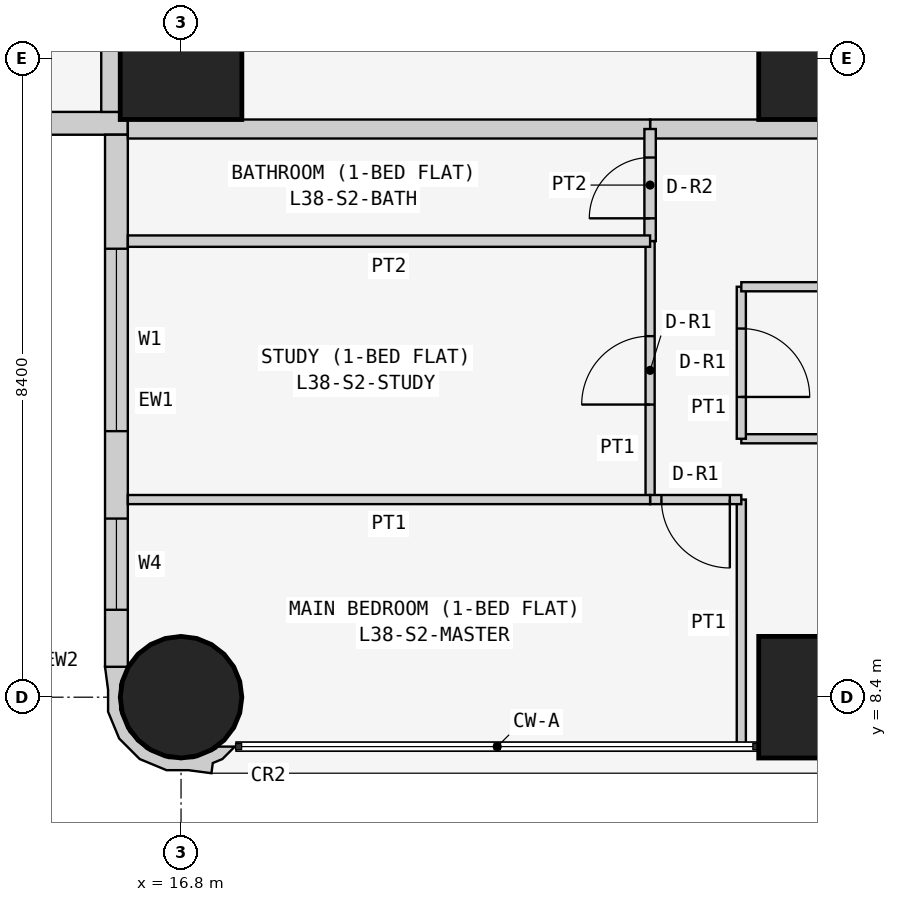
"""IFC4 building model, lengths in metres.
Left out: names, types, materials, properties, quantities, classifications, styles, units other than length and angle.
Written with IfcOpenShell. Run it as: python <this file> out.ifc"""

import sys

from ifc_helpers import new_model, si_unit, direction, frame, frame_2d, origin, origin_2d, place, context, subcontext, project, spatial, polyline, rectangle, circle, outline, extrude, element, fill, save


model = new_model("IFC4")
c1 = context("Model", 3, precision=1e-05, world=origin(), true_north=direction((0.0, 1.0)))
c2 = subcontext(c1, "Body", "Model", "MODEL_VIEW")
j1 = project(units=[si_unit("LENGTHUNIT", "METRE"), si_unit("PLANEANGLEUNIT", "RADIAN")], contexts=[c1])
p1 = place(None, origin())
s1 = spatial("IfcSite", under=j1, at=p1, CompositionType="ELEMENT")
p2 = place(p1, origin())
s2 = spatial("IfcBuilding", under=s1, at=p2, CompositionType="ELEMENT")
p3 = place(p2, frame((0.0, 0.0, 148.5)))
s3 = spatial("IfcBuildingStorey", under=s2, at=p3, CompositionType="ELEMENT", Elevation=148.5)
p4 = place(p3, frame((16.8, 8.4, 0.0), z_axis=(0.0, 0.0, 1.0), x_axis=(1.0, 0.0, 0.0)))
e1 = element("IfcColumn", 1, at=p4, inside=s3, PredefinedType="COLUMN", context=c2, shape_type="SweptSolid", body=[
    extrude(circle(Radius=0.8, at=origin_2d()), origin(), (0.0, 0.0, 1.0), 3.6),
])
for number, where, z_axis, x_axis in (
    (2, (16.8, 16.8, 0.0), (0.0, 0.0, 1.0), (1.0, 0.0, 0.0)),
    (3, (25.2, 8.4, 0.0), (0.0, 0.0, 1.0), (1.0, 0.0, 0.0)),
    (4, (25.2, 16.8, 0.0), (0.0, 0.0, 1.0), (1.0, 0.0, 0.0)),
):
    element("IfcColumn", number, at=place(p3, frame(where, z_axis=z_axis, x_axis=x_axis)), inside=s3, PredefinedType="COLUMN", context=c2, shape_type="SweptSolid", body=[
        extrude(rectangle(XDim=1.6, YDim=1.6, at=origin_2d()), origin(), (0.0, 0.0, 1.0), 3.6),
    ])
p5 = place(p3, frame((0.4, 15.95, 0.0), z_axis=(0.0, 0.0, 1.0), x_axis=(1.0, 0.0, 0.0)))
e5 = element("IfcWall", 5, at=p5, inside=s3, PredefinedType="SOLIDWALL", context=c2, shape_type="SweptSolid", body=[
    extrude(rectangle(XDim=15.7, YDim=0.3, at=frame_2d((7.85, 0.0))), origin(), (0.0, 0.0, 1.0), 3.45),
])
p6 = place(p5, frame((12.4, 0.0, 0.9)))
e6 = element("IfcOpeningElement", 6, at=p6, cuts=e5, PredefinedType="OPENING", context=c2, shape_type="SweptSolid", body=[
    extrude(rectangle(XDim=1.8, YDim=1.5, at=frame_2d((0.9, 0.75))), frame((0.0, 0.16, 0.0), z_axis=(0.0, -1.0, 0.0), x_axis=(1.0, 0.0, 0.0)), (0.0, 0.0, 1.0), 0.32),
])
p7 = place(p5, frame((9.55, 0.0, 1.5)))
e7 = element("IfcOpeningElement", 7, at=p7, cuts=e5, PredefinedType="OPENING", context=c2, shape_type="SweptSolid", body=[
    extrude(rectangle(XDim=0.9, YDim=0.7, at=frame_2d((0.45, 0.35))), frame((0.0, 0.16, 0.0), z_axis=(0.0, -1.0, 0.0), x_axis=(1.0, 0.0, 0.0)), (0.0, 0.0, 1.0), 0.32),
])
p8 = place(p5, frame((5.1, 0.0, 0.9)))
e8 = element("IfcOpeningElement", 8, at=p8, cuts=e5, PredefinedType="OPENING", context=c2, shape_type="SweptSolid", body=[
    extrude(rectangle(XDim=1.8, YDim=1.5, at=frame_2d((0.9, 0.75))), frame((0.0, 0.16, 0.0), z_axis=(0.0, -1.0, 0.0), x_axis=(1.0, 0.0, 0.0)), (0.0, 0.0, 1.0), 0.32),
])
p9 = place(p5, frame((2.0, 0.0, 0.0)))
e9 = element("IfcOpeningElement", 9, at=p9, cuts=e5, PredefinedType="OPENING", context=c2, shape_type="SweptSolid", body=[
    extrude(rectangle(XDim=0.9, YDim=2.4, at=frame_2d((0.45, 1.2))), frame((0.0, 0.16, 0.0), z_axis=(0.0, -1.0, 0.0), x_axis=(1.0, 0.0, 0.0)), (0.0, 0.0, 1.0), 0.32),
])
p10 = place(p5, frame((0.7, 0.0, 0.9)))
e10 = element("IfcOpeningElement", 10, at=p10, cuts=e5, PredefinedType="OPENING", context=c2, shape_type="SweptSolid", body=[
    extrude(rectangle(XDim=1.2, YDim=1.5, at=frame_2d((0.6, 0.75))), frame((0.0, 0.16, 0.0), z_axis=(0.0, -1.0, 0.0), x_axis=(1.0, 0.0, 0.0)), (0.0, 0.0, 1.0), 0.32),
])
p11 = place(p3, frame((15.95, 15.8, 0.0), z_axis=(0.0, 0.0, 1.0), x_axis=(0.0, -1.0, 0.0)))
e11 = element("IfcWall", 11, at=p11, inside=s3, PredefinedType="SOLIDWALL", context=c2, shape_type="SweptSolid", body=[
    extrude(rectangle(XDim=7.0, YDim=0.3, at=frame_2d((3.5, 0.0))), origin(), (0.0, 0.0, 1.0), 3.45),
])
p12 = place(p11, frame((1.5, 0.0, 0.9)))
e12 = element("IfcOpeningElement", 12, at=p12, cuts=e11, PredefinedType="OPENING", context=c2, shape_type="SweptSolid", body=[
    extrude(rectangle(XDim=2.4, YDim=1.5, at=frame_2d((1.2, 0.75))), frame((0.0, 0.16, 0.0), z_axis=(0.0, -1.0, 0.0), x_axis=(1.0, 0.0, 0.0)), (0.0, 0.0, 1.0), 0.32),
])
p13 = place(p11, frame((5.05, 0.0, 0.9)))
e13 = element("IfcOpeningElement", 13, at=p13, cuts=e11, PredefinedType="OPENING", context=c2, shape_type="SweptSolid", body=[
    extrude(rectangle(XDim=1.2, YDim=1.5, at=frame_2d((0.6, 0.75))), frame((0.0, 0.16, 0.0), z_axis=(0.0, -1.0, 0.0), x_axis=(1.0, 0.0, 0.0)), (0.0, 0.0, 1.0), 0.32),
])
p14 = place(p3, frame((15.983, 8.727, 0.0), z_axis=(0.0, 0.0, 1.0), x_axis=(-0.343276641956, -0.93923434088, 0.0)))
e14 = element("IfcWall", 14, at=p14, inside=s3, PredefinedType="SOLIDWALL", context=c2, shape_type="SweptSolid", body=[
    extrude(outline(polyline([(0.829, 1.599), (0.697, 1.569), (0.604, 1.67), (0.394, 1.767), (0.471, 1.556), (0.509, 1.539), (0.724, 1.304), (0.833, 1.005), (0.82, 0.686), (0.686, 0.397), (0.451, 0.182), (0.152, 0.073), (-0.116, 0.084), (-0.127, 0.078), (-0.146, 0.071), (-0.006, -0.197), (0.266, -0.055), (0.535, 0.044), (0.817, 0.302), (0.978, 0.648), (0.994, 1.03), (0.895, 1.3), (0.829, 1.599)])), origin(), (0.0, 0.0, 1.0), 3.45),
])
p15 = place(p3, frame((29.4, 15.875, 0.0), z_axis=(0.0, 0.0, 1.0), x_axis=(-1.0, 0.0, 0.0)))
e15 = element("IfcWall", 15, at=p15, inside=s3, PredefinedType="PARTITIONING", context=c2, shape_type="SweptSolid", body=[
    extrude(rectangle(XDim=6.429, YDim=0.25, at=frame_2d((3.214, 0.0))), origin(), (0.0, 0.0, 1.0), 3.45),
])
p16 = place(p15, frame((0.5, 0.0, 0.0)))
e16 = element("IfcOpeningElement", 16, at=p16, cuts=e15, PredefinedType="OPENING", context=c2, shape_type="SweptSolid", body=[
    extrude(rectangle(XDim=1.0, YDim=2.1, at=frame_2d((0.5, 1.05))), frame((0.0, 0.135, 0.0), z_axis=(0.0, -1.0, 0.0), x_axis=(1.0, 0.0, 0.0)), (0.0, 0.0, 1.0), 0.27),
])
for number, where, z_axis, x_axis in (
    (17, (22.971, 15.875, 0.0), (0.0, 0.0, 1.0), (-1.0, 0.0, 0.0)),
    (18, (15.875, 16.1, 0.0), (0.0, 0.0, 1.0), (0.0, 1.0, 0.0)),
):
    element("IfcWall", number, at=place(p3, frame(where, z_axis=z_axis, x_axis=x_axis)), inside=s3, PredefinedType="PARTITIONING", context=c2, shape_type="SweptSolid", body=[
        extrude(rectangle(XDim=6.871, YDim=0.25, at=frame_2d((3.436, 0.0))), origin(), (0.0, 0.0, 1.0), 3.45),
    ])
p17 = place(p3, frame((29.4, 11.8, 0.0), z_axis=(0.0, 0.0, 1.0), x_axis=(-1.0, 0.0, 0.0)))
e19 = element("IfcWall", 19, at=p17, inside=s3, PredefinedType="PARTITIONING", context=c2, shape_type="SweptSolid", body=[
    extrude(rectangle(XDim=5.229, YDim=0.12, at=frame_2d((2.615, 0.0))), origin(), (0.0, 0.0, 1.0), 3.45),
])
p18 = place(p3, frame((24.171, 11.8, 0.0), z_axis=(0.0, 0.0, 1.0), x_axis=(0.0, 1.0, 0.0)))
e20 = element("IfcWall", 20, at=p18, inside=s3, PredefinedType="PARTITIONING", context=c2, shape_type="SweptSolid", body=[
    extrude(rectangle(XDim=2.0, YDim=0.12, at=frame_2d((1.0, 0.0))), origin(), (0.0, 0.0, 1.0), 3.45),
])
p19 = place(p18, frame((0.55, 0.0, 0.0)))
e21 = element("IfcOpeningElement", 21, at=p19, cuts=e20, PredefinedType="OPENING", context=c2, shape_type="SweptSolid", body=[
    extrude(rectangle(XDim=0.9, YDim=2.1, at=frame_2d((0.45, 1.05))), frame((0.0, 0.07, 0.0), z_axis=(0.0, -1.0, 0.0), x_axis=(1.0, 0.0, 0.0)), (0.0, 0.0, 1.0), 0.14),
])
p20 = place(p3, frame((24.171, 13.8, 0.0), z_axis=(0.0, 0.0, 1.0), x_axis=(1.0, 0.0, 0.0)))
e22 = element("IfcWall", 22, at=p20, inside=s3, PredefinedType="PARTITIONING", context=c2, shape_type="SweptSolid", body=[
    extrude(rectangle(XDim=5.229, YDim=0.12, at=frame_2d((2.615, 0.0))), origin(), (0.0, 0.0, 1.0), 3.45),
])
p21 = place(p3, frame((22.971, 14.4, 0.0), z_axis=(0.0, 0.0, 1.0), x_axis=(0.0, 1.0, 0.0)))
e23 = element("IfcWall", 23, at=p21, inside=s3, PredefinedType="PARTITIONING", context=c2, shape_type="SweptSolid", body=[
    extrude(rectangle(XDim=1.475, YDim=0.15, at=frame_2d((0.738, 0.0))), origin(), (0.0, 0.0, 1.0), 3.45),
])
p22 = place(p21, frame((0.3, 0.0, 0.0)))
e24 = element("IfcOpeningElement", 24, at=p22, cuts=e23, PredefinedType="OPENING", context=c2, shape_type="SweptSolid", body=[
    extrude(rectangle(XDim=0.8, YDim=2.1, at=frame_2d((0.4, 1.05))), frame((0.0, 0.085, 0.0), z_axis=(0.0, -1.0, 0.0), x_axis=(1.0, 0.0, 0.0)), (0.0, 0.0, 1.0), 0.17),
])
p23 = place(p3, frame((22.971, 11.0, 0.0), z_axis=(0.0, 0.0, 1.0), x_axis=(0.0, 1.0, 0.0)))
e25 = element("IfcWall", 25, at=p23, inside=s3, PredefinedType="PARTITIONING", context=c2, shape_type="SweptSolid", body=[
    extrude(rectangle(XDim=3.4, YDim=0.12, at=frame_2d((1.7, 0.0))), origin(), (0.0, 0.0, 1.0), 3.45),
])
p24 = place(p23, frame((1.25, 0.0, 0.0)))
e26 = element("IfcOpeningElement", 26, at=p24, cuts=e25, PredefinedType="OPENING", context=c2, shape_type="SweptSolid", body=[
    extrude(rectangle(XDim=0.9, YDim=2.1, at=frame_2d((0.45, 1.05))), frame((0.0, 0.07, 0.0), z_axis=(0.0, -1.0, 0.0), x_axis=(1.0, 0.0, 0.0)), (0.0, 0.0, 1.0), 0.14),
])
p25 = place(p3, frame((24.171, 7.75, 0.0), z_axis=(0.0, 0.0, 1.0), x_axis=(0.0, 1.0, 0.0)))
e27 = element("IfcWall", 27, at=p25, inside=s3, PredefinedType="PARTITIONING", context=c2, shape_type="SweptSolid", body=[
    extrude(rectangle(XDim=3.25, YDim=0.12, at=frame_2d((1.625, 0.0))), origin(), (0.0, 0.0, 1.0), 3.45),
])
p26 = place(p3, frame((24.171, 11.0, 0.0), z_axis=(0.0, 0.0, 1.0), x_axis=(-1.0, 0.0, 0.0)))
e28 = element("IfcWall", 28, at=p26, inside=s3, PredefinedType="PARTITIONING", context=c2, shape_type="SweptSolid", body=[
    extrude(rectangle(XDim=1.2, YDim=0.12, at=frame_2d((0.6, 0.0))), origin(), (0.0, 0.0, 1.0), 3.45),
])
p27 = place(p26, frame((0.151, 0.0, 0.0)))
e29 = element("IfcOpeningElement", 29, at=p27, cuts=e28, PredefinedType="OPENING", context=c2, shape_type="SweptSolid", body=[
    extrude(rectangle(XDim=0.9, YDim=2.1, at=frame_2d((0.45, 1.05))), frame((0.0, 0.07, 0.0), z_axis=(0.0, -1.0, 0.0), x_axis=(1.0, 0.0, 0.0)), (0.0, 0.0, 1.0), 0.14),
])
p28 = place(p3, frame((22.971, 14.4, 0.0), z_axis=(0.0, 0.0, 1.0), x_axis=(-1.0, 0.0, 0.0)))
e30 = element("IfcWall", 30, at=p28, inside=s3, PredefinedType="PARTITIONING", context=c2, shape_type="SweptSolid", body=[
    extrude(rectangle(XDim=6.871, YDim=0.15, at=frame_2d((3.436, 0.0))), origin(), (0.0, 0.0, 1.0), 3.45),
])
p29 = place(p3, frame((22.971, 11.0, 0.0), z_axis=(0.0, 0.0, 1.0), x_axis=(-1.0, 0.0, 0.0)))
e31 = element("IfcWall", 31, at=p29, inside=s3, PredefinedType="PARTITIONING", context=c2, shape_type="SweptSolid", body=[
    extrude(rectangle(XDim=6.871, YDim=0.12, at=frame_2d((3.436, 0.0))), origin(), (0.0, 0.0, 1.0), 3.45),
])
p30 = place(p12, origin())
e32 = element("IfcWindow", 32, at=p30, inside=s3, PartitioningType="SINGLE_PANEL", PredefinedType="WINDOW", context=c2, shape_type="SweptSolid", body=[
    extrude(rectangle(XDim=2.4, YDim=1.5, at=frame_2d((1.2, 0.75))), frame((0.0, 0.03, 0.0), z_axis=(0.0, -1.0, 0.0), x_axis=(1.0, 0.0, 0.0)), (0.0, 0.0, 1.0), 0.06),
])
fill(e12, e32)
p31 = place(p13, origin())
e33 = element("IfcWindow", 33, at=p31, inside=s3, PartitioningType="SINGLE_PANEL", PredefinedType="WINDOW", context=c2, shape_type="SweptSolid", body=[
    extrude(rectangle(XDim=1.2, YDim=1.5, at=frame_2d((0.6, 0.75))), frame((0.0, 0.03, 0.0), z_axis=(0.0, -1.0, 0.0), x_axis=(1.0, 0.0, 0.0)), (0.0, 0.0, 1.0), 0.06),
])
fill(e13, e33)
p32 = place(p19, frame((0.9, 0.0, 0.0), z_axis=(0.0, 0.0, 1.0), x_axis=(-1.0, 0.0, 0.0)))
e34 = element("IfcDoor", 34, at=p32, inside=s3, OperationType="SINGLE_SWING_RIGHT", PredefinedType="DOOR", context=c2, shape_type="SweptSolid", body=[
    extrude(rectangle(XDim=0.9, YDim=2.1, at=frame_2d((0.45, 1.05))), frame((0.0, 0.025, 0.0), z_axis=(0.0, -1.0, 0.0), x_axis=(1.0, 0.0, 0.0)), (0.0, 0.0, 1.0), 0.05),
])
fill(e21, e34)
p33 = place(p22, origin())
e35 = element("IfcDoor", 35, at=p33, inside=s3, OperationType="SINGLE_SWING_LEFT", PredefinedType="DOOR", context=c2, shape_type="SweptSolid", body=[
    extrude(rectangle(XDim=0.8, YDim=2.1, at=frame_2d((0.4, 1.05))), frame((0.0, 0.025, 0.0), z_axis=(0.0, -1.0, 0.0), x_axis=(1.0, 0.0, 0.0)), (0.0, 0.0, 1.0), 0.05),
])
fill(e24, e35)
p34 = place(p24, origin())
e36 = element("IfcDoor", 36, at=p34, inside=s3, OperationType="SINGLE_SWING_LEFT", PredefinedType="DOOR", context=c2, shape_type="SweptSolid", body=[
    extrude(rectangle(XDim=0.9, YDim=2.1, at=frame_2d((0.45, 1.05))), frame((0.0, 0.025, 0.0), z_axis=(0.0, -1.0, 0.0), x_axis=(1.0, 0.0, 0.0)), (0.0, 0.0, 1.0), 0.05),
])
fill(e26, e36)
p35 = place(p27, origin())
e37 = element("IfcDoor", 37, at=p35, inside=s3, OperationType="SINGLE_SWING_LEFT", PredefinedType="DOOR", context=c2, shape_type="SweptSolid", body=[
    extrude(rectangle(XDim=0.9, YDim=2.1, at=frame_2d((0.45, 1.05))), frame((0.0, 0.025, 0.0), z_axis=(0.0, -1.0, 0.0), x_axis=(1.0, 0.0, 0.0)), (0.0, 0.0, 1.0), 0.05),
])
fill(e29, e37)
save(model, sys.argv[1])
